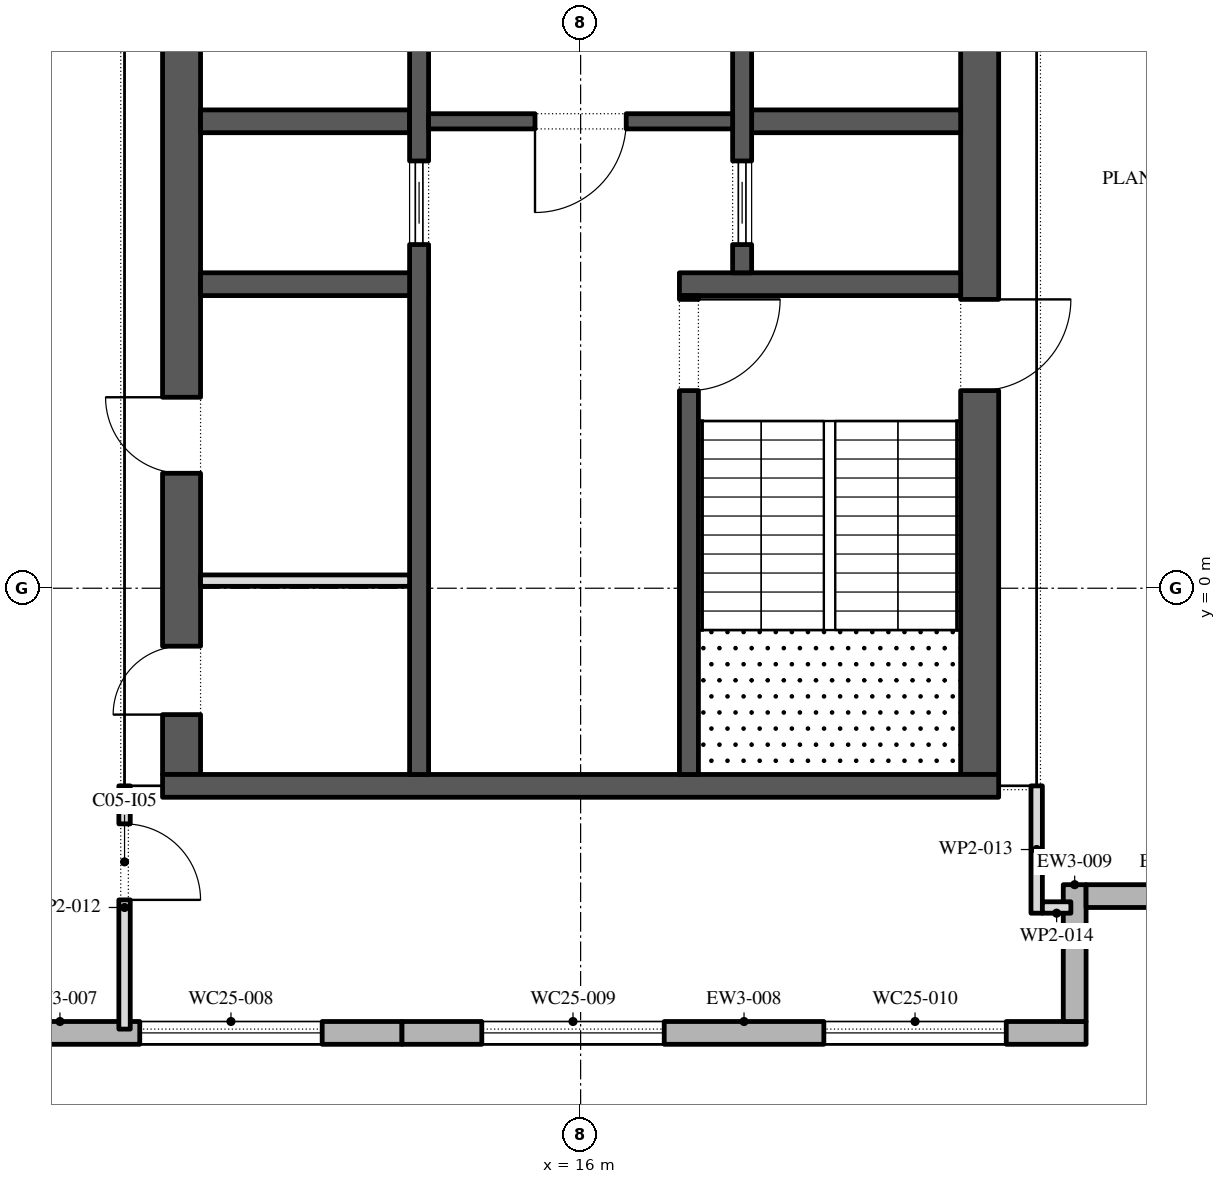
"""IFC4 building model, lengths in metres.
Left out: names, types, materials, properties, quantities, classifications, styles, units other than length and angle.
Written with IfcOpenShell. Run it as: python <this file> out.ifc"""

import sys

from ifc_helpers import new_model, si_unit, direction, frame, frame_2d, origin, place, context, subcontext, project, spatial, polyline, rectangle, outline, extrude, element, fill, save


model = new_model("IFC4")
c1 = context("Model", 3, precision=1e-05, world=origin(), true_north=direction((0.0, 1.0)))
c2 = subcontext(c1, "Body", "Model", "MODEL_VIEW")
j1 = project(units=[si_unit("LENGTHUNIT", "METRE"), si_unit("PLANEANGLEUNIT", "RADIAN")], contexts=[c1])
p1 = place(None, origin())
s1 = spatial("IfcSite", under=j1, at=p1, CompositionType="ELEMENT")
p2 = place(p1, origin())
s2 = spatial("IfcBuilding", under=s1, at=p2, CompositionType="ELEMENT")
p3 = place(p2, frame((0.0, 0.0, 385.8)))
s3 = spatial("IfcBuildingStorey", under=s2, at=p3, CompositionType="ELEMENT", Elevation=385.8)
p4 = place(p3, frame((4.65, -5.85, 0.0), z_axis=(0.0, 0.0, 1.0), x_axis=(1.0, 0.0, 0.0)))
e1 = element("IfcWall", 1, at=p4, inside=s3, PredefinedType="STANDARD", context=c2, shape_type="SweptSolid", body=[
    extrude(rectangle(XDim=9.0, YDim=0.3, at=frame_2d((4.5, 0.0))), origin(), (0.0, 0.0, 1.0), 4.0),
])
p5 = place(p4, frame((1.05, 0.0, 0.8)))
e2 = element("IfcOpeningElement", 2, at=p5, cuts=e1, PredefinedType="OPENING", context=c2, shape_type="SweptSolid", body=[
    extrude(outline(polyline([(0.0, 0.0), (2.4, 0.0), (2.4, 1.25), (2.377, 1.488), (2.31, 1.717), (2.2, 1.929), (2.051, 2.116), (1.87, 2.272), (1.663, 2.391), (1.437, 2.468), (1.2, 2.5), (0.963, 2.468), (0.737, 2.391), (0.53, 2.272), (0.349, 2.116), (0.2, 1.929), (0.09, 1.717), (0.023, 1.488), (0.0, 1.25), (0.0, 0.0)])), frame((0.0, 0.16, 0.0), z_axis=(0.0, -1.0, 0.0), x_axis=(1.0, 0.0, 0.0)), (0.0, 0.0, 1.0), 0.32),
])
p6 = place(p4, frame((5.55, 0.0, 0.8)))
e3 = element("IfcOpeningElement", 3, at=p6, cuts=e1, PredefinedType="OPENING", context=c2, shape_type="SweptSolid", body=[
    extrude(outline(polyline([(0.0, 0.0), (2.4, 0.0), (2.4, 1.25), (2.377, 1.488), (2.31, 1.717), (2.2, 1.929), (2.051, 2.116), (1.87, 2.272), (1.663, 2.391), (1.437, 2.468), (1.2, 2.5), (0.963, 2.468), (0.737, 2.391), (0.53, 2.272), (0.349, 2.116), (0.2, 1.929), (0.09, 1.717), (0.023, 1.488), (0.0, 1.25), (0.0, 0.0)])), frame((0.0, 0.16, 0.0), z_axis=(0.0, -1.0, 0.0), x_axis=(1.0, 0.0, 0.0)), (0.0, 0.0, 1.0), 0.32),
])
p7 = place(p3, frame((13.65, -5.85, 0.0), z_axis=(0.0, 0.0, 1.0), x_axis=(1.0, 0.0, 0.0)))
e4 = element("IfcWall", 4, at=p7, inside=s3, PredefinedType="STANDARD", context=c2, shape_type="SweptSolid", body=[
    extrude(rectangle(XDim=9.0, YDim=0.3, at=frame_2d((4.5, 0.0))), origin(), (0.0, 0.0, 1.0), 4.0),
])
p8 = place(p7, frame((1.05, 0.0, 0.8)))
e5 = element("IfcOpeningElement", 5, at=p8, cuts=e4, PredefinedType="OPENING", context=c2, shape_type="SweptSolid", body=[
    extrude(outline(polyline([(0.0, 0.0), (2.4, 0.0), (2.4, 1.25), (2.377, 1.488), (2.31, 1.717), (2.2, 1.929), (2.051, 2.116), (1.87, 2.272), (1.663, 2.391), (1.437, 2.468), (1.2, 2.5), (0.963, 2.468), (0.737, 2.391), (0.53, 2.272), (0.349, 2.116), (0.2, 1.929), (0.09, 1.717), (0.023, 1.488), (0.0, 1.25), (0.0, 0.0)])), frame((0.0, 0.16, 0.0), z_axis=(0.0, -1.0, 0.0), x_axis=(1.0, 0.0, 0.0)), (0.0, 0.0, 1.0), 0.32),
])
p9 = place(p7, frame((5.55, 0.0, 0.8)))
e6 = element("IfcOpeningElement", 6, at=p9, cuts=e4, PredefinedType="OPENING", context=c2, shape_type="SweptSolid", body=[
    extrude(outline(polyline([(0.0, 0.0), (2.4, 0.0), (2.4, 1.25), (2.377, 1.488), (2.31, 1.717), (2.2, 1.929), (2.051, 2.116), (1.87, 2.272), (1.663, 2.391), (1.437, 2.468), (1.2, 2.5), (0.963, 2.468), (0.737, 2.391), (0.53, 2.272), (0.349, 2.116), (0.2, 1.929), (0.09, 1.717), (0.023, 1.488), (0.0, 1.25), (0.0, 0.0)])), frame((0.0, 0.16, 0.0), z_axis=(0.0, -1.0, 0.0), x_axis=(1.0, 0.0, 0.0)), (0.0, 0.0, 1.0), 0.32),
])
p10 = place(p3, frame((22.5, -5.7, 0.0), z_axis=(0.0, 0.0, 1.0), x_axis=(0.0, 1.0, 0.0)))
e7 = element("IfcWall", 7, at=p10, inside=s3, PredefinedType="STANDARD", context=c2, shape_type="SweptSolid", body=[
    extrude(rectangle(XDim=1.8, YDim=0.3, at=frame_2d((0.9, 0.0))), origin(), (0.0, 0.0, 1.0), 4.0),
])
p11 = place(p3, frame((22.65, -4.05, 0.0), z_axis=(0.0, 0.0, 1.0), x_axis=(1.0, 0.0, 0.0)))
e8 = element("IfcWall", 8, at=p11, inside=s3, PredefinedType="STANDARD", context=c2, shape_type="SweptSolid", body=[
    extrude(rectangle(XDim=2.4, YDim=0.3, at=frame_2d((1.2, 0.0))), origin(), (0.0, 0.0, 1.0), 4.0),
])
p12 = place(p3, frame((21.25, -2.45, 0.0), z_axis=(0.0, 0.0, 1.0), x_axis=(0.0, 1.0, 0.0)))
e9 = element("IfcWall", 9, at=p12, inside=s3, PredefinedType="SHEAR", context=c2, shape_type="SweptSolid", body=[
    extrude(rectangle(XDim=27.9, YDim=0.5, at=frame_2d((13.95, 0.0))), origin(), (0.0, 0.0, 1.0), 4.0),
])
p13 = place(p12, frame((5.05, 0.0, 0.0)))
e10 = element("IfcOpeningElement", 10, at=p13, cuts=e9, PredefinedType="OPENING", context=c2, shape_type="SweptSolid", body=[
    extrude(rectangle(XDim=1.2, YDim=2.1, at=frame_2d((0.6, 1.05))), frame((0.0, 0.26, 0.0), z_axis=(0.0, -1.0, 0.0), x_axis=(1.0, 0.0, 0.0)), (0.0, 0.0, 1.0), 0.52),
])
p14 = place(p12, frame((21.65, 0.0, 0.0)))
e11 = element("IfcOpeningElement", 11, at=p14, cuts=e9, PredefinedType="OPENING", context=c2, shape_type="SweptSolid", body=[
    extrude(rectangle(XDim=1.2, YDim=2.1, at=frame_2d((0.6, 1.05))), frame((0.0, 0.26, 0.0), z_axis=(0.0, -1.0, 0.0), x_axis=(1.0, 0.0, 0.0)), (0.0, 0.0, 1.0), 0.52),
])
p15 = place(p3, frame((10.75, -2.45, 0.0), z_axis=(0.0, 0.0, 1.0), x_axis=(0.0, 1.0, 0.0)))
e12 = element("IfcWall", 12, at=p15, inside=s3, PredefinedType="SHEAR", context=c2, shape_type="SweptSolid", body=[
    extrude(rectangle(XDim=27.9, YDim=0.5, at=frame_2d((13.95, 0.0))), origin(), (0.0, 0.0, 1.0), 4.0),
])
p16 = place(p15, frame((23.65, 0.0, 0.0)))
e13 = element("IfcOpeningElement", 13, at=p16, cuts=e12, PredefinedType="OPENING", context=c2, shape_type="SweptSolid", body=[
    extrude(rectangle(XDim=2.4, YDim=2.1, at=frame_2d((1.2, 1.05))), frame((0.0, 0.26, 0.0), z_axis=(0.0, -1.0, 0.0), x_axis=(1.0, 0.0, 0.0)), (0.0, 0.0, 1.0), 0.52),
])
p17 = place(p15, frame((0.788, 0.0, 0.0)))
e14 = element("IfcOpeningElement", 14, at=p17, cuts=e12, PredefinedType="OPENING", context=c2, shape_type="SweptSolid", body=[
    extrude(rectangle(XDim=0.9, YDim=2.1, at=frame_2d((0.45, 1.05))), frame((0.0, 0.26, 0.0), z_axis=(0.0, -1.0, 0.0), x_axis=(1.0, 0.0, 0.0)), (0.0, 0.0, 1.0), 0.52),
])
p18 = place(p15, frame((3.962, 0.0, 0.0)))
e15 = element("IfcOpeningElement", 15, at=p18, cuts=e12, PredefinedType="OPENING", context=c2, shape_type="SweptSolid", body=[
    extrude(rectangle(XDim=1.0, YDim=2.1, at=frame_2d((0.5, 1.05))), frame((0.0, 0.26, 0.0), z_axis=(0.0, -1.0, 0.0), x_axis=(1.0, 0.0, 0.0)), (0.0, 0.0, 1.0), 0.52),
])
p19 = place(p3, frame((10.5, -2.6, 0.0), z_axis=(0.0, 0.0, 1.0), x_axis=(1.0, 0.0, 0.0)))
e16 = element("IfcWall", 16, at=p19, inside=s3, PredefinedType="SHEAR", context=c2, shape_type="SweptSolid", body=[
    extrude(rectangle(XDim=11.0, YDim=0.3, at=frame_2d((5.5, 0.0))), origin(), (0.0, 0.0, 1.0), 4.0),
])
p20 = place(p3, frame((17.3, 4.0, 0.0), z_axis=(0.0, 0.0, 1.0), x_axis=(1.0, 0.0, 0.0)))
e17 = element("IfcWall", 17, at=p20, inside=s3, PredefinedType="SHEAR", context=c2, shape_type="SweptSolid", body=[
    extrude(rectangle(XDim=3.7, YDim=0.3, at=frame_2d((1.85, 0.0))), origin(), (0.0, 0.0, 1.0), 4.0),
])
p21 = place(p3, frame((17.425, -2.45, 0.0), z_axis=(0.0, 0.0, 1.0), x_axis=(0.0, 1.0, 0.0)))
e18 = element("IfcWall", 18, at=p21, inside=s3, PredefinedType="SHEAR", context=c2, shape_type="SweptSolid", body=[
    extrude(rectangle(XDim=6.3, YDim=0.25, at=frame_2d((3.15, 0.0))), origin(), (0.0, 0.0, 1.0), 4.0),
])
p22 = place(p21, frame((5.05, 0.0, 0.0)))
e19 = element("IfcOpeningElement", 19, at=p22, cuts=e18, PredefinedType="OPENING", context=c2, shape_type="SweptSolid", body=[
    extrude(rectangle(XDim=1.2, YDim=2.1, at=frame_2d((0.6, 1.05))), frame((0.0, 0.135, 0.0), z_axis=(0.0, -1.0, 0.0), x_axis=(1.0, 0.0, 0.0)), (0.0, 0.0, 1.0), 0.27),
])
p23 = place(p3, frame((18.25, 6.143, 0.0), z_axis=(0.0, 0.0, 1.0), x_axis=(1.0, 0.0, 0.0)))
e20 = element("IfcWall", 20, at=p23, inside=s3, PredefinedType="SHEAR", context=c2, shape_type="SweptSolid", body=[
    extrude(rectangle(XDim=2.75, YDim=0.3, at=frame_2d((1.375, 0.0))), origin(), (0.0, 0.0, 1.0), 4.0),
])
p24 = place(p3, frame((18.125, 4.15, 0.0), z_axis=(0.0, 0.0, 1.0), x_axis=(0.0, 1.0, 0.0)))
e21 = element("IfcWall", 21, at=p24, inside=s3, PredefinedType="SHEAR", context=c2, shape_type="SweptSolid", body=[
    extrude(rectangle(XDim=14.7, YDim=0.25, at=frame_2d((7.35, 0.0))), origin(), (0.0, 0.0, 1.0), 4.0),
])
p25 = place(p24, frame((4.846, 0.0, 0.0)))
e22 = element("IfcOpeningElement", 22, at=p25, cuts=e21, PredefinedType="OPENING", context=c2, shape_type="SweptSolid", body=[
    extrude(rectangle(XDim=0.9, YDim=2.1, at=frame_2d((0.45, 1.05))), frame((0.0, 0.135, 0.0), z_axis=(0.0, -1.0, 0.0), x_axis=(1.0, 0.0, 0.0)), (0.0, 0.0, 1.0), 0.27),
])
p26 = place(p24, frame((11.125, 0.0, 0.0)))
e23 = element("IfcOpeningElement", 23, at=p26, cuts=e21, PredefinedType="OPENING", context=c2, shape_type="SweptSolid", body=[
    extrude(rectangle(XDim=0.9, YDim=2.1, at=frame_2d((0.45, 1.05))), frame((0.0, 0.135, 0.0), z_axis=(0.0, -1.0, 0.0), x_axis=(1.0, 0.0, 0.0)), (0.0, 0.0, 1.0), 0.27),
])
p27 = place(p24, frame((0.371, 0.0, 0.0)))
e24 = element("IfcOpeningElement", 24, at=p27, cuts=e21, PredefinedType="OPENING", context=c2, shape_type="SweptSolid", body=[
    extrude(rectangle(XDim=1.1, YDim=2.1, at=frame_2d((0.55, 1.05))), frame((0.0, 0.135, 0.0), z_axis=(0.0, -1.0, 0.0), x_axis=(1.0, 0.0, 0.0)), (0.0, 0.0, 1.0), 0.27),
])
p28 = place(p3, frame((11.0, 4.0, 0.0), z_axis=(0.0, 0.0, 1.0), x_axis=(1.0, 0.0, 0.0)))
e25 = element("IfcWall", 25, at=p28, inside=s3, PredefinedType="SHEAR", context=c2, shape_type="SweptSolid", body=[
    extrude(rectangle(XDim=3.0, YDim=0.3, at=frame_2d((1.5, 0.0))), origin(), (0.0, 0.0, 1.0), 4.0),
])
p29 = place(p3, frame((11.0, 6.143, 0.0), z_axis=(0.0, 0.0, 1.0), x_axis=(1.0, 0.0, 0.0)))
e26 = element("IfcWall", 26, at=p29, inside=s3, PredefinedType="SHEAR", context=c2, shape_type="SweptSolid", body=[
    extrude(rectangle(XDim=2.75, YDim=0.3, at=frame_2d((1.375, 0.0))), origin(), (0.0, 0.0, 1.0), 4.0),
])
p30 = place(p3, frame((13.875, -2.45, 0.0), z_axis=(0.0, 0.0, 1.0), x_axis=(0.0, 1.0, 0.0)))
e27 = element("IfcWall", 27, at=p30, inside=s3, PredefinedType="SHEAR", context=c2, shape_type="SweptSolid", body=[
    extrude(rectangle(XDim=21.3, YDim=0.25, at=frame_2d((10.65, 0.0))), origin(), (0.0, 0.0, 1.0), 4.0),
])
p31 = place(p30, frame((10.396, 0.0, 0.0)))
e28 = element("IfcOpeningElement", 28, at=p31, cuts=e27, PredefinedType="OPENING", context=c2, shape_type="SweptSolid", body=[
    extrude(rectangle(XDim=0.9, YDim=2.1, at=frame_2d((0.45, 1.05))), frame((0.0, 0.135, 0.0), z_axis=(0.0, -1.0, 0.0), x_axis=(1.0, 0.0, 0.0)), (0.0, 0.0, 1.0), 0.27),
])
p32 = place(p30, frame((14.6, 0.0, 0.0)))
e29 = element("IfcOpeningElement", 29, at=p32, cuts=e27, PredefinedType="OPENING", context=c2, shape_type="SweptSolid", body=[
    extrude(rectangle(XDim=0.9, YDim=2.1, at=frame_2d((0.45, 1.05))), frame((0.0, 0.135, 0.0), z_axis=(0.0, -1.0, 0.0), x_axis=(1.0, 0.0, 0.0)), (0.0, 0.0, 1.0), 0.27),
])
p33 = place(p30, frame((18.775, 0.0, 0.0)))
e30 = element("IfcOpeningElement", 30, at=p33, cuts=e27, PredefinedType="OPENING", context=c2, shape_type="SweptSolid", body=[
    extrude(rectangle(XDim=0.9, YDim=2.1, at=frame_2d((0.45, 1.05))), frame((0.0, 0.135, 0.0), z_axis=(0.0, -1.0, 0.0), x_axis=(1.0, 0.0, 0.0)), (0.0, 0.0, 1.0), 0.27),
])
p34 = place(p30, frame((6.971, 0.0, 0.0)))
e31 = element("IfcOpeningElement", 31, at=p34, cuts=e27, PredefinedType="OPENING", context=c2, shape_type="SweptSolid", body=[
    extrude(rectangle(XDim=1.1, YDim=2.1, at=frame_2d((0.55, 1.05))), frame((0.0, 0.135, 0.0), z_axis=(0.0, -1.0, 0.0), x_axis=(1.0, 0.0, 0.0)), (0.0, 0.0, 1.0), 0.27),
])
p35 = place(p3, frame((14.0, 6.143, 0.0), z_axis=(0.0, 0.0, 1.0), x_axis=(1.0, 0.0, 0.0)))
e32 = element("IfcWall", 32, at=p35, inside=s3, PredefinedType="SHEAR", context=c2, shape_type="SweptSolid", body=[
    extrude(rectangle(XDim=4.0, YDim=0.2, at=frame_2d((2.0, 0.0))), origin(), (0.0, 0.0, 1.0), 4.0),
])
p36 = place(p35, frame((1.4, 0.0, 0.0)))
e33 = element("IfcOpeningElement", 33, at=p36, cuts=e32, PredefinedType="OPENING", context=c2, shape_type="SweptSolid", body=[
    extrude(rectangle(XDim=1.2, YDim=2.1, at=frame_2d((0.6, 1.05))), frame((0.0, 0.11, 0.0), z_axis=(0.0, -1.0, 0.0), x_axis=(1.0, 0.0, 0.0)), (0.0, 0.0, 1.0), 0.22),
])
p37 = place(p3, frame((11.0, 0.1, 0.0), z_axis=(0.0, 0.0, 1.0), x_axis=(1.0, 0.0, 0.0)))
e34 = element("IfcWall", 34, at=p37, inside=s3, PredefinedType="PARTITIONING", context=c2, shape_type="SweptSolid", body=[
    extrude(rectangle(XDim=2.75, YDim=0.15, at=frame_2d((1.375, 0.0))), origin(), (0.0, 0.0, 1.0), 4.0),
])
p38 = place(p3, frame((10.0, -2.6, 0.0), z_axis=(0.0, 0.0, 1.0), x_axis=(0.0, -1.0, 0.0)))
e35 = element("IfcWall", 35, at=p38, inside=s3, PredefinedType="PARTITIONING", context=c2, shape_type="SweptSolid", body=[
    extrude(rectangle(XDim=3.2, YDim=0.15, at=frame_2d((1.6, 0.0))), origin(), (0.0, 0.0, 1.0), 4.0),
])
p39 = place(p38, frame((0.5, 0.0, 0.0)))
e36 = element("IfcOpeningElement", 36, at=p39, cuts=e35, PredefinedType="OPENING", context=c2, shape_type="SweptSolid", body=[
    extrude(rectangle(XDim=1.0, YDim=2.1, at=frame_2d((0.5, 1.05))), frame((0.0, 0.085, 0.0), z_axis=(0.0, -1.0, 0.0), x_axis=(1.0, 0.0, 0.0)), (0.0, 0.0, 1.0), 0.17),
])
p40 = place(p3, frame((22.0, -4.275, 0.0), z_axis=(0.0, 0.0, 1.0), x_axis=(0.0, 1.0, 0.0)))
e37 = element("IfcWall", 37, at=p40, inside=s3, PredefinedType="PARTITIONING", context=c2, shape_type="SweptSolid", body=[
    extrude(rectangle(XDim=1.675, YDim=0.15, at=frame_2d((0.837, 0.0))), origin(), (0.0, 0.0, 1.0), 4.0),
])
p41 = place(p3, frame((22.45, -4.2, 0.0), z_axis=(0.0, 0.0, 1.0), x_axis=(-1.0, 0.0, 0.0)))
e38 = element("IfcWall", 38, at=p41, inside=s3, PredefinedType="PARTITIONING", context=c2, shape_type="SweptSolid", body=[
    extrude(rectangle(XDim=0.375, YDim=0.15, at=frame_2d((0.188, 0.0))), origin(), (0.0, 0.0, 1.0), 4.0),
])
p42 = place(p6, origin())
e39 = element("IfcWindow", 39, at=p42, inside=s3, PartitioningType="DOUBLE_PANEL_VERTICAL", PredefinedType="WINDOW", context=c2, shape_type="SweptSolid", body=[
    extrude(outline(polyline([(0.0, 0.0), (2.4, 0.0), (2.4, 1.25), (2.377, 1.488), (2.31, 1.717), (2.2, 1.929), (2.051, 2.116), (1.87, 2.272), (1.663, 2.391), (1.437, 2.468), (1.2, 2.5), (0.963, 2.468), (0.737, 2.391), (0.53, 2.272), (0.349, 2.116), (0.2, 1.929), (0.09, 1.717), (0.023, 1.488), (0.0, 1.25), (0.0, 0.0)])), frame((0.0, 0.03, 0.0), z_axis=(0.0, -1.0, 0.0), x_axis=(1.0, 0.0, 0.0)), (0.0, 0.0, 1.0), 0.06),
])
fill(e3, e39)
p43 = place(p8, origin())
e40 = element("IfcWindow", 40, at=p43, inside=s3, PartitioningType="DOUBLE_PANEL_VERTICAL", PredefinedType="WINDOW", context=c2, shape_type="SweptSolid", body=[
    extrude(outline(polyline([(0.0, 0.0), (2.4, 0.0), (2.4, 1.25), (2.377, 1.488), (2.31, 1.717), (2.2, 1.929), (2.051, 2.116), (1.87, 2.272), (1.663, 2.391), (1.437, 2.468), (1.2, 2.5), (0.963, 2.468), (0.737, 2.391), (0.53, 2.272), (0.349, 2.116), (0.2, 1.929), (0.09, 1.717), (0.023, 1.488), (0.0, 1.25), (0.0, 0.0)])), frame((0.0, 0.03, 0.0), z_axis=(0.0, -1.0, 0.0), x_axis=(1.0, 0.0, 0.0)), (0.0, 0.0, 1.0), 0.06),
])
fill(e5, e40)
p44 = place(p9, origin())
e41 = element("IfcWindow", 41, at=p44, inside=s3, PartitioningType="DOUBLE_PANEL_VERTICAL", PredefinedType="WINDOW", context=c2, shape_type="SweptSolid", body=[
    extrude(outline(polyline([(0.0, 0.0), (2.4, 0.0), (2.4, 1.25), (2.377, 1.488), (2.31, 1.717), (2.2, 1.929), (2.051, 2.116), (1.87, 2.272), (1.663, 2.391), (1.437, 2.468), (1.2, 2.5), (0.963, 2.468), (0.737, 2.391), (0.53, 2.272), (0.349, 2.116), (0.2, 1.929), (0.09, 1.717), (0.023, 1.488), (0.0, 1.25), (0.0, 0.0)])), frame((0.0, 0.03, 0.0), z_axis=(0.0, -1.0, 0.0), x_axis=(1.0, 0.0, 0.0)), (0.0, 0.0, 1.0), 0.06),
])
fill(e6, e41)
p45 = place(p27, origin())
e42 = element("IfcDoor", 42, at=p45, inside=s3, OperationType="SLIDING_TO_LEFT", PredefinedType="DOOR", context=c2, shape_type="SweptSolid", body=[
    extrude(rectangle(XDim=1.1, YDim=2.1, at=frame_2d((0.55, 1.05))), frame((0.0, 0.025, 0.0), z_axis=(0.0, -1.0, 0.0), x_axis=(1.0, 0.0, 0.0)), (0.0, 0.0, 1.0), 0.05),
])
fill(e24, e42)
p46 = place(p34, origin())
e43 = element("IfcDoor", 43, at=p46, inside=s3, OperationType="SLIDING_TO_LEFT", PredefinedType="DOOR", context=c2, shape_type="SweptSolid", body=[
    extrude(rectangle(XDim=1.1, YDim=2.1, at=frame_2d((0.55, 1.05))), frame((0.0, 0.025, 0.0), z_axis=(0.0, -1.0, 0.0), x_axis=(1.0, 0.0, 0.0)), (0.0, 0.0, 1.0), 0.05),
])
fill(e31, e43)
p47 = place(p36, frame((1.2, 0.0, 0.0), z_axis=(0.0, 0.0, 1.0), x_axis=(-1.0, 0.0, 0.0)))
e44 = element("IfcDoor", 44, at=p47, inside=s3, OperationType="SINGLE_SWING_LEFT", PredefinedType="DOOR", context=c2, shape_type="SweptSolid", body=[
    extrude(rectangle(XDim=1.2, YDim=2.1, at=frame_2d((0.6, 1.05))), frame((0.0, 0.025, 0.0), z_axis=(0.0, -1.0, 0.0), x_axis=(1.0, 0.0, 0.0)), (0.0, 0.0, 1.0), 0.05),
])
fill(e33, e44)
p48 = place(p22, frame((1.2, 0.0, 0.0), z_axis=(0.0, 0.0, 1.0), x_axis=(-1.0, 0.0, 0.0)))
e45 = element("IfcDoor", 45, at=p48, inside=s3, OperationType="SINGLE_SWING_RIGHT", PredefinedType="DOOR", context=c2, shape_type="SweptSolid", body=[
    extrude(rectangle(XDim=1.2, YDim=2.1, at=frame_2d((0.6, 1.05))), frame((0.0, 0.025, 0.0), z_axis=(0.0, -1.0, 0.0), x_axis=(1.0, 0.0, 0.0)), (0.0, 0.0, 1.0), 0.05),
])
fill(e19, e45)
p49 = place(p13, frame((1.2, 0.0, 0.0), z_axis=(0.0, 0.0, 1.0), x_axis=(-1.0, 0.0, 0.0)))
e46 = element("IfcDoor", 46, at=p49, inside=s3, OperationType="SINGLE_SWING_RIGHT", PredefinedType="DOOR", context=c2, shape_type="SweptSolid", body=[
    extrude(rectangle(XDim=1.2, YDim=2.1, at=frame_2d((0.6, 1.05))), frame((0.0, 0.025, 0.0), z_axis=(0.0, -1.0, 0.0), x_axis=(1.0, 0.0, 0.0)), (0.0, 0.0, 1.0), 0.05),
])
fill(e10, e46)
p50 = place(p17, origin())
e47 = element("IfcDoor", 47, at=p50, inside=s3, OperationType="SINGLE_SWING_RIGHT", PredefinedType="DOOR", context=c2, shape_type="SweptSolid", body=[
    extrude(rectangle(XDim=0.9, YDim=2.1, at=frame_2d((0.45, 1.05))), frame((0.0, -0.2, 0.0), z_axis=(0.0, -1.0, 0.0), x_axis=(1.0, 0.0, 0.0)), (0.0, 0.0, 1.0), 0.05),
])
fill(e14, e47)
p51 = place(p18, origin())
e48 = element("IfcDoor", 48, at=p51, inside=s3, OperationType="SINGLE_SWING_LEFT", PredefinedType="DOOR", context=c2, shape_type="SweptSolid", body=[
    extrude(rectangle(XDim=1.0, YDim=2.1, at=frame_2d((0.5, 1.05))), frame((0.0, -0.2, 0.0), z_axis=(0.0, -1.0, 0.0), x_axis=(1.0, 0.0, 0.0)), (0.0, 0.0, 1.0), 0.05),
])
fill(e15, e48)
p52 = place(p39, origin())
e49 = element("IfcDoor", 49, at=p52, inside=s3, OperationType="SINGLE_SWING_LEFT", PredefinedType="DOOR", context=c2, shape_type="SweptSolid", body=[
    extrude(rectangle(XDim=1.0, YDim=2.1, at=frame_2d((0.5, 1.05))), frame((0.0, 0.025, 0.0), z_axis=(0.0, -1.0, 0.0), x_axis=(1.0, 0.0, 0.0)), (0.0, 0.0, 1.0), 0.05),
])
fill(e36, e49)
save(model, sys.argv[1])
